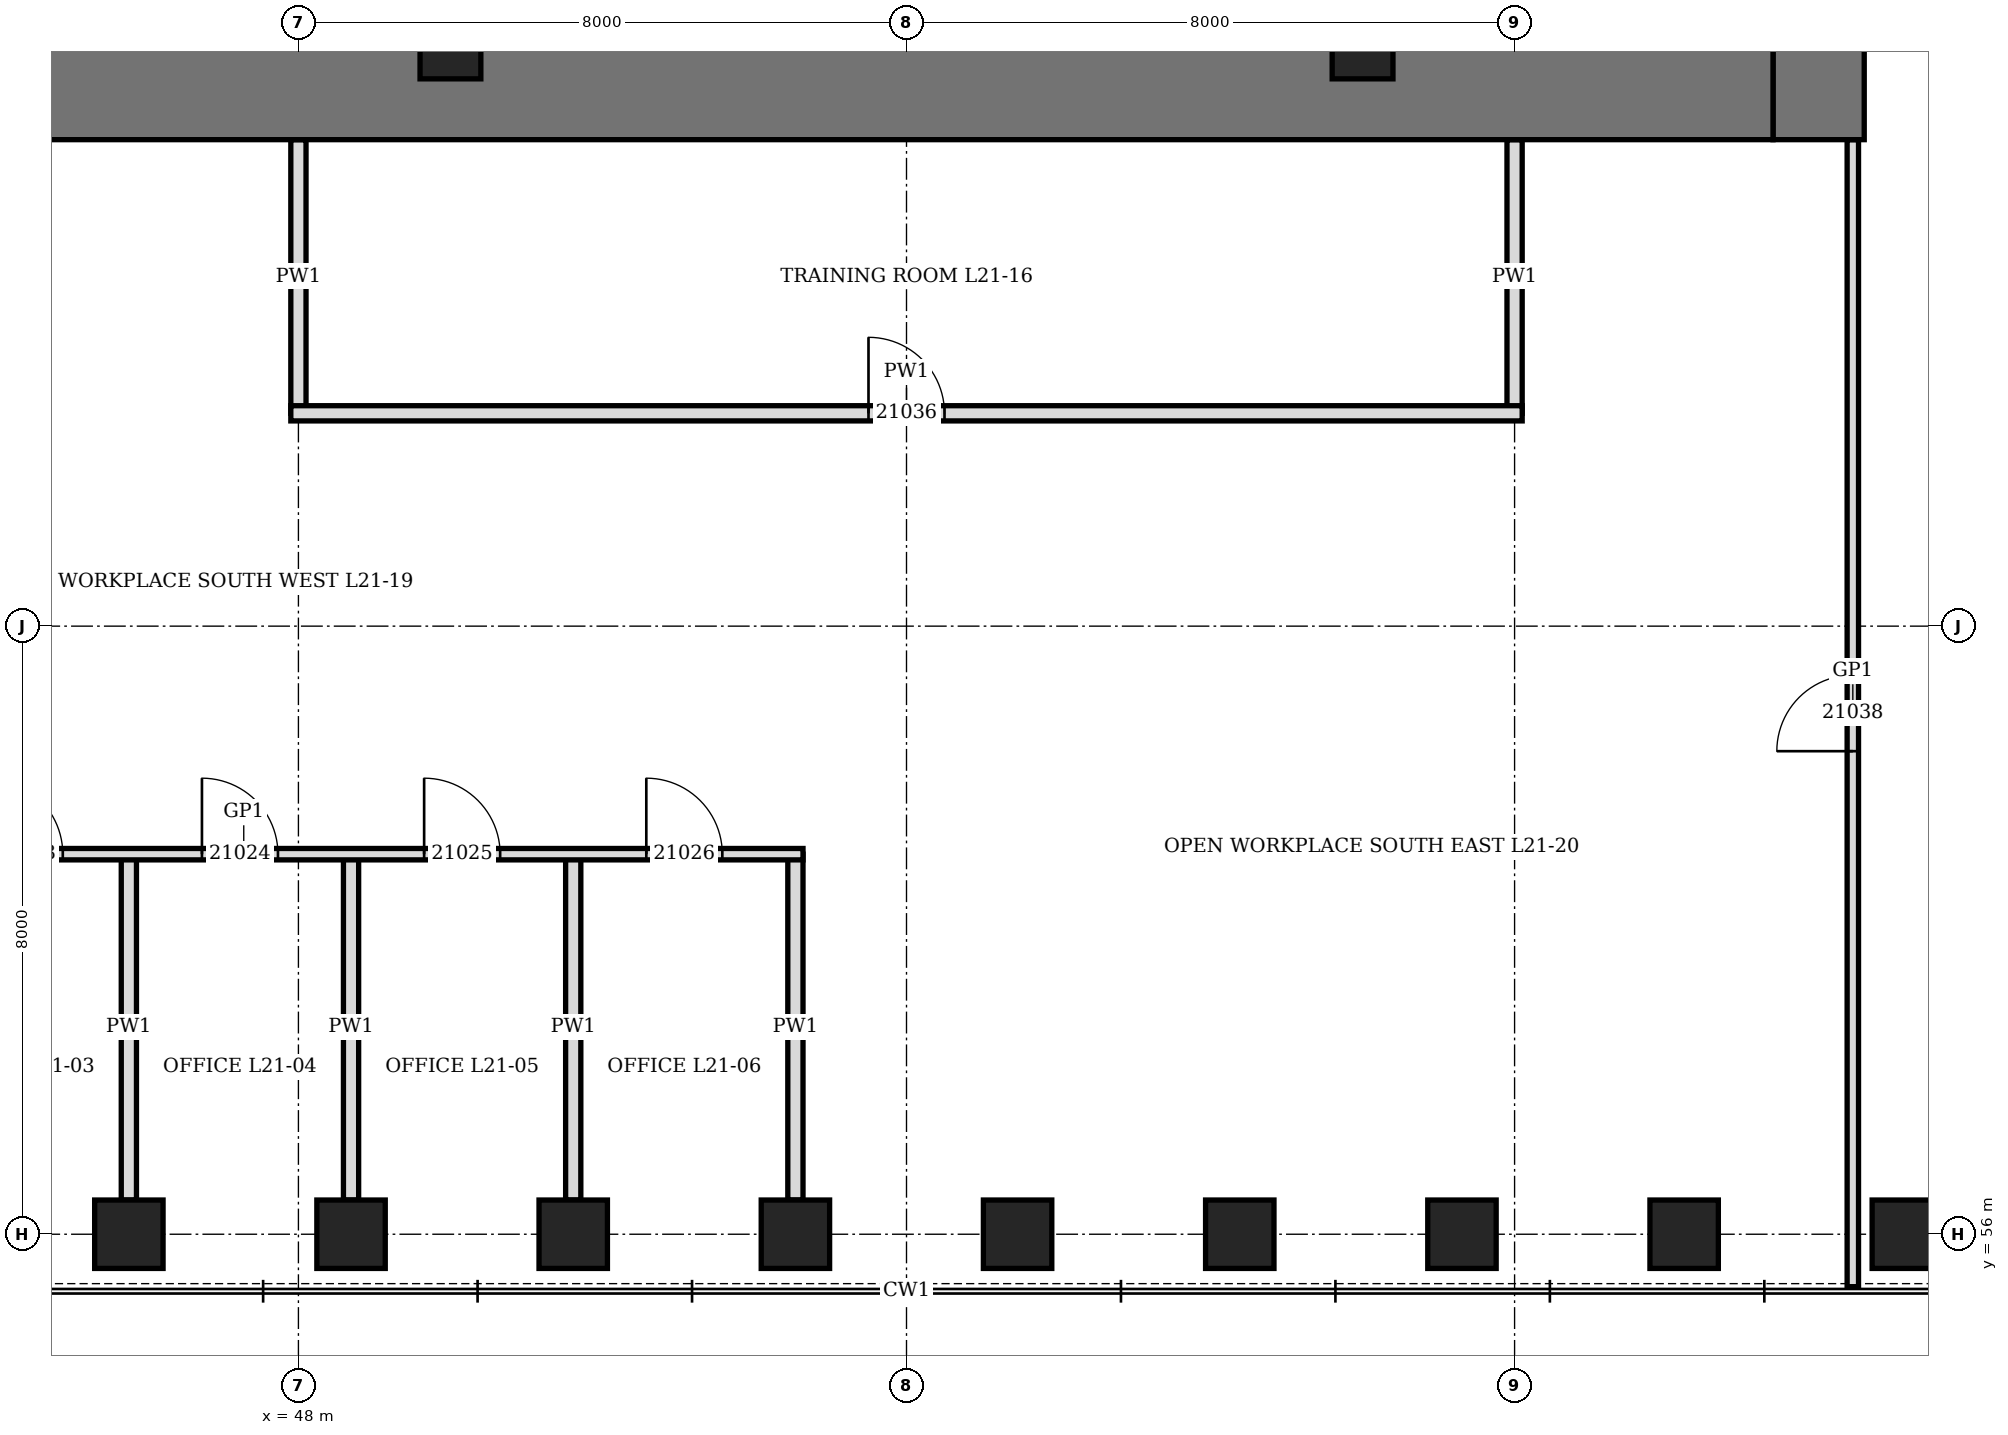
"""IFC4 building model, lengths in metres.
Left out: names, types, materials, properties, quantities, classifications, styles, units other than length and angle.
Written with IfcOpenShell. Run it as: python <this file> out.ifc"""

import sys

from ifc_helpers import new_model, si_unit, direction, frame, frame_2d, origin, origin_2d, place, context, subcontext, project, spatial, rectangle, hollow_rectangle, extrude, element, fill, save


model = new_model("IFC4")
c1 = context("Model", 3, precision=1e-05, world=origin(), true_north=direction((0.0, 1.0)))
c2 = subcontext(c1, "Body", "Model", "MODEL_VIEW")
j1 = project(units=[si_unit("LENGTHUNIT", "METRE"), si_unit("PLANEANGLEUNIT", "RADIAN")], contexts=[c1])
p1 = place(None, origin())
s1 = spatial("IfcSite", under=j1, at=p1, CompositionType="ELEMENT")
p2 = place(p1, origin())
s2 = spatial("IfcBuilding", under=s1, at=p2, CompositionType="ELEMENT")
p3 = place(p2, frame((0.0, 0.0, 97.9)))
s3 = spatial("IfcBuildingStorey", under=s2, at=p3, CompositionType="ELEMENT", Elevation=97.9)
for number, where, z_axis, x_axis in (
    (1, (45.769, 56.0, 0.0), (0.0, 0.0, 1.0), (1.0, 0.0, 0.0)),
    (2, (48.692, 56.0, 0.0), (0.0, 0.0, 1.0), (1.0, 0.0, 0.0)),
    (3, (51.615, 56.0, 0.0), (0.0, 0.0, 1.0), (1.0, 0.0, 0.0)),
    (4, (54.539, 56.0, 0.0), (0.0, 0.0, 1.0), (1.0, 0.0, 0.0)),
    (5, (57.461, 56.0, 0.0), (0.0, 0.0, 1.0), (1.0, 0.0, 0.0)),
    (6, (60.385, 56.0, 0.0), (0.0, 0.0, 1.0), (1.0, 0.0, 0.0)),
    (7, (63.308, 56.0, 0.0), (0.0, 0.0, 1.0), (1.0, 0.0, 0.0)),
    (8, (66.231, 56.0, 0.0), (0.0, 0.0, 1.0), (1.0, 0.0, 0.0)),
    (9, (69.154, 56.0, 0.0), (0.0, 0.0, 1.0), (1.0, 0.0, 0.0)),
):
    element("IfcColumn", number, at=place(p3, frame(where, z_axis=z_axis, x_axis=x_axis)), inside=s3, PredefinedType="COLUMN", context=c2, shape_type="SweptSolid", body=[
        extrude(hollow_rectangle(XDim=0.9, YDim=0.9, WallThickness=0.12, at=origin_2d()), origin(), (0.0, 0.0, 1.0), 4.2),
    ])
p4 = place(p3, frame((68.0, 70.4, 0.0), z_axis=(0.0, 0.0, 1.0), x_axis=(0.0, 1.0, 0.0)))
e10 = element("IfcWall", 10, at=p4, inside=s3, PredefinedType="SHEAR", context=c2, shape_type="SweptSolid", body=[
    extrude(rectangle(XDim=19.2, YDim=1.2, at=frame_2d((9.6, 0.0))), origin(), (0.0, 0.0, 1.0), 4.2),
])
p5 = place(p4, frame((8.6, 0.0, 0.0)))
e11 = element("IfcOpeningElement", 11, at=p5, cuts=e10, PredefinedType="OPENING", context=c2, shape_type="SweptSolid", body=[
    extrude(rectangle(XDim=2.0, YDim=2.4, at=frame_2d((1.0, 1.2))), frame((0.0, 0.61, 0.0), z_axis=(0.0, -1.0, 0.0), x_axis=(1.0, 0.0, 0.0)), (0.0, 0.0, 1.0), 1.22),
])
p6 = place(p3, frame((44.6, 71.0, 0.0), z_axis=(0.0, 0.0, 1.0), x_axis=(1.0, 0.0, 0.0)))
e12 = element("IfcWall", 12, at=p6, inside=s3, PredefinedType="SHEAR", context=c2, shape_type="SweptSolid", body=[
    extrude(rectangle(XDim=22.8, YDim=1.2, at=frame_2d((11.4, 0.0))), origin(), (0.0, 0.0, 1.0), 4.2),
])
for number, where, z_axis, x_axis in (
    (13, (50.0, 71.6, 0.0), (0.0, 0.0, 1.0), (1.0, 0.0, 0.0)),
    (14, (62.0, 71.6, 0.0), (0.0, 0.0, 1.0), (1.0, 0.0, 0.0)),
):
    element("IfcColumn", number, at=place(p3, frame(where, z_axis=z_axis, x_axis=x_axis)), inside=s3, PredefinedType="COLUMN", context=c2, shape_type="SweptSolid", body=[
        extrude(hollow_rectangle(XDim=0.8, YDim=0.8, WallThickness=0.1, at=origin_2d()), origin(), (0.0, 0.0, 1.0), 4.2),
    ])
for number, where, z_axis, x_axis in (
    (15, (45.769, 56.45, 0.0), (0.0, 0.0, 1.0), (0.0, 1.0, 0.0)),
    (16, (48.692, 56.45, 0.0), (0.0, 0.0, 1.0), (0.0, 1.0, 0.0)),
    (17, (51.615, 56.45, 0.0), (0.0, 0.0, 1.0), (0.0, 1.0, 0.0)),
    (18, (54.539, 56.45, 0.0), (0.0, 0.0, 1.0), (0.0, 1.0, 0.0)),
):
    element("IfcWall", number, at=place(p3, frame(where, z_axis=z_axis, x_axis=x_axis)), inside=s3, PredefinedType="PARTITIONING", context=c2, shape_type="SweptSolid", body=[
        extrude(rectangle(XDim=4.55, YDim=0.2, at=frame_2d((2.275, 0.0))), origin(), (0.0, 0.0, 1.0), 1.95),
    ])
for number, where, z_axis, x_axis in (
    (19, (48.0, 66.8, 0.0), (0.0, 0.0, 1.0), (0.0, 1.0, 0.0)),
    (20, (64.0, 66.8, 0.0), (0.0, 0.0, 1.0), (0.0, 1.0, 0.0)),
):
    element("IfcWall", number, at=place(p3, frame(where, z_axis=z_axis, x_axis=x_axis)), inside=s3, PredefinedType="PARTITIONING", context=c2, shape_type="SweptSolid", body=[
        extrude(rectangle(XDim=3.6, YDim=0.2, at=frame_2d((1.8, 0.0))), origin(), (0.0, 0.0, 1.0), 3.95),
    ])
p7 = place(p3, frame((39.923, 61.0, 0.0), z_axis=(0.0, 0.0, 1.0), x_axis=(1.0, 0.0, 0.0)))
e21 = element("IfcWall", 21, at=p7, inside=s3, PredefinedType="PARTITIONING", context=c2, shape_type="SweptSolid", body=[
    extrude(rectangle(XDim=14.715, YDim=0.15, at=frame_2d((7.358, 0.0))), origin(), (0.0, 0.0, 1.0), 3.95),
])
p8 = place(p7, frame((0.961, 0.0, 0.0)))
e22 = element("IfcOpeningElement", 22, at=p8, cuts=e21, PredefinedType="OPENING", context=c2, shape_type="SweptSolid", body=[
    extrude(rectangle(XDim=1.0, YDim=2.1, at=frame_2d((0.5, 1.05))), frame((0.0, 0.085, 0.0), z_axis=(0.0, -1.0, 0.0), x_axis=(1.0, 0.0, 0.0)), (0.0, 0.0, 1.0), 0.17),
])
p9 = place(p7, frame((3.977, 0.0, 0.0)))
e23 = element("IfcOpeningElement", 23, at=p9, cuts=e21, PredefinedType="OPENING", context=c2, shape_type="SweptSolid", body=[
    extrude(rectangle(XDim=1.0, YDim=2.1, at=frame_2d((0.5, 1.05))), frame((0.0, 0.085, 0.0), z_axis=(0.0, -1.0, 0.0), x_axis=(1.0, 0.0, 0.0)), (0.0, 0.0, 1.0), 0.17),
])
p10 = place(p7, frame((6.808, 0.0, 0.0)))
e24 = element("IfcOpeningElement", 24, at=p10, cuts=e21, PredefinedType="OPENING", context=c2, shape_type="SweptSolid", body=[
    extrude(rectangle(XDim=1.0, YDim=2.1, at=frame_2d((0.5, 1.05))), frame((0.0, 0.085, 0.0), z_axis=(0.0, -1.0, 0.0), x_axis=(1.0, 0.0, 0.0)), (0.0, 0.0, 1.0), 0.17),
])
p11 = place(p7, frame((9.731, 0.0, 0.0)))
e25 = element("IfcOpeningElement", 25, at=p11, cuts=e21, PredefinedType="OPENING", context=c2, shape_type="SweptSolid", body=[
    extrude(rectangle(XDim=1.0, YDim=2.1, at=frame_2d((0.5, 1.05))), frame((0.0, 0.085, 0.0), z_axis=(0.0, -1.0, 0.0), x_axis=(1.0, 0.0, 0.0)), (0.0, 0.0, 1.0), 0.17),
])
p12 = place(p7, frame((12.654, 0.0, 0.0)))
e26 = element("IfcOpeningElement", 26, at=p12, cuts=e21, PredefinedType="OPENING", context=c2, shape_type="SweptSolid", body=[
    extrude(rectangle(XDim=1.0, YDim=2.1, at=frame_2d((0.5, 1.05))), frame((0.0, 0.085, 0.0), z_axis=(0.0, -1.0, 0.0), x_axis=(1.0, 0.0, 0.0)), (0.0, 0.0, 1.0), 0.17),
])
p13 = place(p3, frame((47.9, 66.8, 0.0), z_axis=(0.0, 0.0, 1.0), x_axis=(1.0, 0.0, 0.0)))
e27 = element("IfcWall", 27, at=p13, inside=s3, PredefinedType="PARTITIONING", context=c2, shape_type="SweptSolid", body=[
    extrude(rectangle(XDim=16.2, YDim=0.2, at=frame_2d((8.1, 0.0))), origin(), (0.0, 0.0, 1.0), 3.95),
])
p14 = place(p13, frame((7.6, 0.0, 0.0)))
e28 = element("IfcOpeningElement", 28, at=p14, cuts=e27, PredefinedType="OPENING", context=c2, shape_type="SweptSolid", body=[
    extrude(rectangle(XDim=1.0, YDim=2.1, at=frame_2d((0.5, 1.05))), frame((0.0, 0.11, 0.0), z_axis=(0.0, -1.0, 0.0), x_axis=(1.0, 0.0, 0.0)), (0.0, 0.0, 1.0), 0.22),
])
p15 = place(p3, frame((68.45, 55.31, 0.0), z_axis=(0.0, 0.0, 1.0), x_axis=(0.0, 1.0, 0.0)))
e29 = element("IfcWall", 29, at=p15, inside=s3, PredefinedType="PARTITIONING", context=c2, shape_type="SweptSolid", body=[
    extrude(rectangle(XDim=15.09, YDim=0.15, at=frame_2d((7.545, 0.0))), origin(), (0.0, 0.0, 1.0), 3.95),
])
p16 = place(p15, frame((7.045, 0.0, 0.0)))
e30 = element("IfcOpeningElement", 30, at=p16, cuts=e29, PredefinedType="OPENING", context=c2, shape_type="SweptSolid", body=[
    extrude(rectangle(XDim=1.0, YDim=2.4, at=frame_2d((0.5, 1.2))), frame((0.0, 0.085, 0.0), z_axis=(0.0, -1.0, 0.0), x_axis=(1.0, 0.0, 0.0)), (0.0, 0.0, 1.0), 0.17),
])
p17 = place(p9, origin())
e31 = element("IfcDoor", 31, at=p17, inside=s3, OperationType="SINGLE_SWING_LEFT", PredefinedType="DOOR", context=c2, shape_type="SweptSolid", body=[
    extrude(rectangle(XDim=1.0, YDim=2.1, at=frame_2d((0.5, 1.05))), frame((0.0, 0.075, 0.0), z_axis=(0.0, -1.0, 0.0), x_axis=(1.0, 0.0, 0.0)), (0.0, 0.0, 1.0), 0.149),
])
fill(e23, e31)
p18 = place(p10, origin())
e32 = element("IfcDoor", 32, at=p18, inside=s3, OperationType="SINGLE_SWING_LEFT", PredefinedType="DOOR", context=c2, shape_type="SweptSolid", body=[
    extrude(rectangle(XDim=1.0, YDim=2.1, at=frame_2d((0.5, 1.05))), frame((0.0, 0.075, 0.0), z_axis=(0.0, -1.0, 0.0), x_axis=(1.0, 0.0, 0.0)), (0.0, 0.0, 1.0), 0.149),
])
fill(e24, e32)
p19 = place(p11, origin())
e33 = element("IfcDoor", 33, at=p19, inside=s3, OperationType="SINGLE_SWING_LEFT", PredefinedType="DOOR", context=c2, shape_type="SweptSolid", body=[
    extrude(rectangle(XDim=1.0, YDim=2.1, at=frame_2d((0.5, 1.05))), frame((0.0, 0.075, 0.0), z_axis=(0.0, -1.0, 0.0), x_axis=(1.0, 0.0, 0.0)), (0.0, 0.0, 1.0), 0.149),
])
fill(e25, e33)
p20 = place(p12, origin())
e34 = element("IfcDoor", 34, at=p20, inside=s3, OperationType="SINGLE_SWING_LEFT", PredefinedType="DOOR", context=c2, shape_type="SweptSolid", body=[
    extrude(rectangle(XDim=1.0, YDim=2.1, at=frame_2d((0.5, 1.05))), frame((0.0, 0.075, 0.0), z_axis=(0.0, -1.0, 0.0), x_axis=(1.0, 0.0, 0.0)), (0.0, 0.0, 1.0), 0.149),
])
fill(e26, e34)
p21 = place(p14, origin())
e35 = element("IfcDoor", 35, at=p21, inside=s3, OperationType="SINGLE_SWING_LEFT", PredefinedType="DOOR", context=c2, shape_type="SweptSolid", body=[
    extrude(rectangle(XDim=1.0, YDim=2.1, at=frame_2d((0.5, 1.05))), frame((0.0, 0.1, 0.0), z_axis=(0.0, -1.0, 0.0), x_axis=(1.0, 0.0, 0.0)), (0.0, 0.0, 1.0), 0.199),
])
fill(e28, e35)
p22 = place(p16, origin())
e36 = element("IfcDoor", 36, at=p22, inside=s3, OperationType="SINGLE_SWING_RIGHT", PredefinedType="DOOR", context=c2, shape_type="SweptSolid", body=[
    extrude(rectangle(XDim=1.0, YDim=2.4, at=frame_2d((0.5, 1.2))), frame((0.0, 0.075, 0.0), z_axis=(0.0, -1.0, 0.0), x_axis=(1.0, 0.0, 0.0)), (0.0, 0.0, 1.0), 0.149),
])
fill(e30, e36)
save(model, sys.argv[1])
